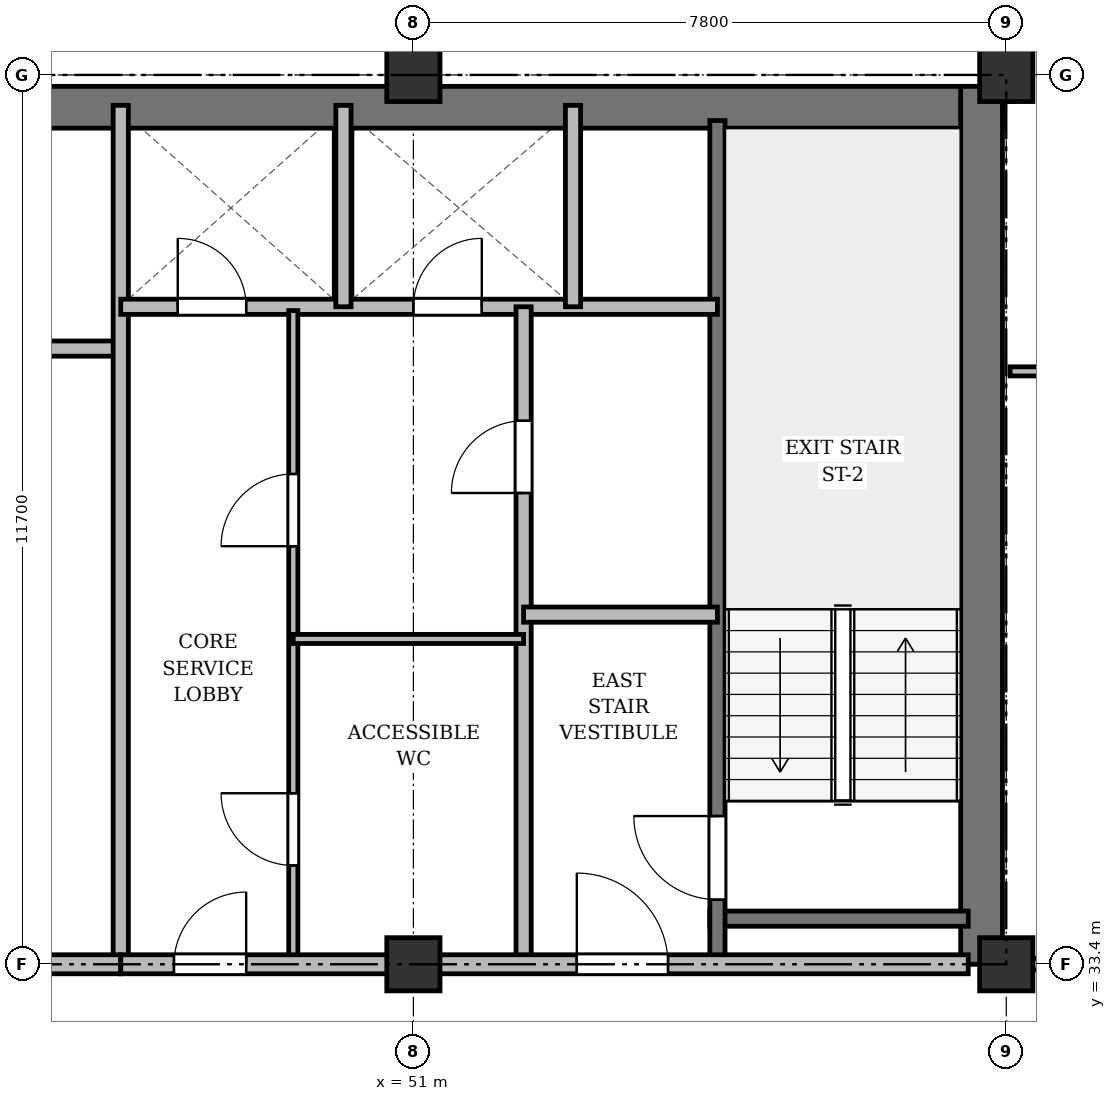
"""IFC4 building model, lengths in metres.
Left out: names, types, materials, properties, quantities, classifications, styles, units other than length and angle.
Written with IfcOpenShell. Run it as: python <this file> out.ifc"""

import sys

from ifc_helpers import new_model, si_unit, direction, frame, frame_2d, origin, origin_2d, place, context, subcontext, project, spatial, rectangle, extrude, source, transform, mapped, element, fill, save


model = new_model("IFC4")
c1 = context("Model", 3, precision=1e-05, world=origin(), true_north=direction((0.0, 1.0)))
c2 = subcontext(c1, "Body", "Model", "MODEL_VIEW")
j1 = project(units=[si_unit("LENGTHUNIT", "METRE"), si_unit("PLANEANGLEUNIT", "RADIAN")], contexts=[c1])
p1 = place(None, origin())
s1 = spatial("IfcSite", under=j1, at=p1, CompositionType="ELEMENT")
p2 = place(p1, origin())
s2 = spatial("IfcBuilding", under=s1, at=p2, CompositionType="ELEMENT")
p3 = place(p2, frame((0.0, 0.0, 164.5)))
s3 = spatial("IfcBuildingStorey", under=s2, at=p3, CompositionType="ELEMENT", Elevation=164.5)
m1 = source(origin(), c2, "Body", "SweptSolid", [
    extrude(rectangle(XDim=0.7, YDim=0.7, at=origin_2d()), origin(), (0.0, 0.0, 1.0), 3.6),
])
for number, where, z_axis, x_axis in (
    (1, (51.0, 33.4, 0.0), (0.0, 0.0, 1.0), (1.0, 0.0, 0.0)),
    (2, (51.0, 45.1, 0.0), (0.0, 0.0, 1.0), (1.0, 0.0, 0.0)),
    (3, (58.8, 33.4, 0.0), (0.0, 0.0, 1.0), (1.0, 0.0, 0.0)),
    (4, (58.8, 45.1, 0.0), (0.0, 0.0, 1.0), (1.0, 0.0, 0.0)),
):
    element("IfcColumn", number, at=place(p3, frame(where, z_axis=z_axis, x_axis=x_axis)), inside=s3, PredefinedType="COLUMN", context=c2, shape_type="MappedRepresentation", body=[
        mapped(m1, transform((0.0, 0.0, 0.0), x_axis=(1.0, 0.0, 0.0), y_axis=(0.0, 1.0, 0.0), z_axis=(0.0, 0.0, 1.0), scale=1.0)),
    ])
p4 = place(p3, frame((15.65, 44.675, 0.0), z_axis=(0.0, 0.0, 1.0), x_axis=(1.0, 0.0, 0.0)))
e5 = element("IfcWall", 5, at=p4, inside=s3, PredefinedType="SHEAR", context=c2, shape_type="SweptSolid", body=[
    extrude(rectangle(XDim=43.1, YDim=0.55, at=frame_2d((21.55, 0.0))), origin(), (0.0, 0.0, 1.0), 3.35),
])
p5 = place(p3, frame((58.475, 33.4, 0.0), z_axis=(0.0, 0.0, 1.0), x_axis=(0.0, 1.0, 0.0)))
e6 = element("IfcWall", 6, at=p5, inside=s3, PredefinedType="SHEAR", context=c2, shape_type="SweptSolid", body=[
    extrude(rectangle(XDim=11.55, YDim=0.55, at=frame_2d((5.775, 0.0))), origin(), (0.0, 0.0, 1.0), 3.35),
])
p6 = place(p3, frame((54.9, 34.0, 0.0), z_axis=(0.0, 0.0, 1.0), x_axis=(1.0, 0.0, 0.0)))
e7 = element("IfcWall", 7, at=p6, inside=s3, PredefinedType="SHEAR", context=c2, shape_type="SweptSolid", body=[
    extrude(rectangle(XDim=3.4, YDim=0.2, at=frame_2d((1.7, 0.0))), origin(), (0.0, 0.0, 1.0), 3.35),
])
p7 = place(p3, frame((55.0, 33.4, 0.0), z_axis=(0.0, 0.0, 1.0), x_axis=(0.0, 1.0, 0.0)))
e8 = element("IfcWall", 8, at=p7, inside=s3, PredefinedType="SHEAR", context=c2, shape_type="SweptSolid", body=[
    extrude(rectangle(XDim=11.1, YDim=0.2, at=frame_2d((5.55, 0.0))), origin(), (0.0, 0.0, 1.0), 3.35),
])
p8 = place(p7, frame((0.85, 0.0, 0.0)))
e9 = element("IfcOpeningElement", 9, at=p8, cuts=e8, PredefinedType="OPENING", context=c2, shape_type="SweptSolid", body=[
    extrude(rectangle(XDim=1.1, YDim=2.15, at=frame_2d((0.55, 1.075))), frame((0.0, 0.11, 0.0), z_axis=(0.0, -1.0, 0.0), x_axis=(1.0, 0.0, 0.0)), (0.0, 0.0, 1.0), 0.22),
])
p9 = place(p3, frame((40.25, 41.5, 0.0), z_axis=(0.0, 0.0, 1.0), x_axis=(1.0, 0.0, 0.0)))
e10 = element("IfcWall", 10, at=p9, inside=s3, PredefinedType="SOLIDWALL", context=c2, shape_type="SweptSolid", body=[
    extrude(rectangle(XDim=6.9, YDim=0.2, at=frame_2d((3.45, 0.0))), origin(), (0.0, 0.0, 1.0), 2.85),
])
p10 = place(p3, frame((47.15, 33.4, 0.0), z_axis=(0.0, 0.0, 1.0), x_axis=(0.0, 1.0, 0.0)))
e11 = element("IfcWall", 11, at=p10, inside=s3, PredefinedType="SOLIDWALL", context=c2, shape_type="SweptSolid", body=[
    extrude(rectangle(XDim=11.3, YDim=0.2, at=frame_2d((5.65, 0.0))), origin(), (0.0, 0.0, 1.0), 2.75),
])
p11 = place(p3, frame((33.3, 33.4, 0.0), z_axis=(0.0, 0.0, 1.0), x_axis=(1.0, 0.0, 0.0)))
e12 = element("IfcWall", 12, at=p11, inside=s3, PredefinedType="PARTITIONING", context=c2, shape_type="SweptSolid", body=[
    extrude(rectangle(XDim=13.85, YDim=0.25, at=frame_2d((6.925, 0.0))), origin(), (0.0, 0.0, 1.0), 2.75),
])
p12 = place(p11, frame((4.2, 0.0, 0.0)))
e13 = element("IfcOpeningElement", 13, at=p12, cuts=e12, PredefinedType="OPENING", context=c2, shape_type="SweptSolid", body=[
    extrude(rectangle(XDim=1.6, YDim=2.2, at=frame_2d((0.8, 1.1))), frame((0.0, 0.135, 0.0), z_axis=(0.0, -1.0, 0.0), x_axis=(1.0, 0.0, 0.0)), (0.0, 0.0, 1.0), 0.27),
])
p13 = place(p3, frame((47.15, 42.05, 0.0), z_axis=(0.0, 0.0, 1.0), x_axis=(1.0, 0.0, 0.0)))
e14 = element("IfcWall", 14, at=p13, inside=s3, PredefinedType="SOLIDWALL", context=c2, shape_type="SweptSolid", body=[
    extrude(rectangle(XDim=7.85, YDim=0.2, at=frame_2d((3.925, 0.0))), origin(), (0.0, 0.0, 1.0), 2.85),
])
p14 = place(p13, frame((0.75, 0.0, 0.0)))
e15 = element("IfcOpeningElement", 15, at=p14, cuts=e14, PredefinedType="OPENING", context=c2, shape_type="SweptSolid", body=[
    extrude(rectangle(XDim=0.9, YDim=2.1, at=frame_2d((0.45, 1.05))), frame((0.0, 0.11, 0.0), z_axis=(0.0, -1.0, 0.0), x_axis=(1.0, 0.0, 0.0)), (0.0, 0.0, 1.0), 0.22),
])
p15 = place(p13, frame((3.85, 0.0, 0.0)))
e16 = element("IfcOpeningElement", 16, at=p15, cuts=e14, PredefinedType="OPENING", context=c2, shape_type="SweptSolid", body=[
    extrude(rectangle(XDim=0.9, YDim=2.1, at=frame_2d((0.45, 1.05))), frame((0.0, 0.11, 0.0), z_axis=(0.0, -1.0, 0.0), x_axis=(1.0, 0.0, 0.0)), (0.0, 0.0, 1.0), 0.22),
])
for number, where, z_axis, x_axis in (
    (17, (50.08, 42.05, 0.0), (0.0, 0.0, 1.0), (0.0, 1.0, 0.0)),
    (18, (53.1, 42.05, 0.0), (0.0, 0.0, 1.0), (0.0, 1.0, 0.0)),
):
    element("IfcWall", number, at=place(p3, frame(where, z_axis=z_axis, x_axis=x_axis)), inside=s3, PredefinedType="SOLIDWALL", context=c2, shape_type="SweptSolid", body=[
        extrude(rectangle(XDim=2.65, YDim=0.2, at=frame_2d((1.325, 0.0))), origin(), (0.0, 0.0, 1.0), 3.35),
    ])
p16 = place(p3, frame((52.45, 33.4, 0.0), z_axis=(0.0, 0.0, 1.0), x_axis=(0.0, 1.0, 0.0)))
e19 = element("IfcWall", 19, at=p16, inside=s3, PredefinedType="PARTITIONING", context=c2, shape_type="SweptSolid", body=[
    extrude(rectangle(XDim=8.65, YDim=0.2, at=frame_2d((4.325, 0.0))), origin(), (0.0, 0.0, 1.0), 2.75),
])
p17 = place(p16, frame((6.2, 0.0, 0.0)))
e20 = element("IfcOpeningElement", 20, at=p17, cuts=e19, PredefinedType="OPENING", context=c2, shape_type="SweptSolid", body=[
    extrude(rectangle(XDim=0.95, YDim=2.15, at=frame_2d((0.475, 1.075))), frame((0.0, 0.11, 0.0), z_axis=(0.0, -1.0, 0.0), x_axis=(1.0, 0.0, 0.0)), (0.0, 0.0, 1.0), 0.22),
])
p18 = place(p3, frame((52.45, 38.0, 0.0), z_axis=(0.0, 0.0, 1.0), x_axis=(1.0, 0.0, 0.0)))
e21 = element("IfcWall", 21, at=p18, inside=s3, PredefinedType="PARTITIONING", context=c2, shape_type="SweptSolid", body=[
    extrude(rectangle(XDim=2.55, YDim=0.2, at=frame_2d((1.275, 0.0))), origin(), (0.0, 0.0, 1.0), 3.35),
])
p19 = place(p3, frame((49.42, 33.4, 0.0), z_axis=(0.0, 0.0, 1.0), x_axis=(0.0, 1.0, 0.0)))
e22 = element("IfcWall", 22, at=p19, inside=s3, PredefinedType="PARTITIONING", context=c2, shape_type="SweptSolid", body=[
    extrude(rectangle(XDim=8.6, YDim=0.12, at=frame_2d((4.3, 0.0))), origin(), (0.0, 0.0, 1.0), 2.75),
])
p20 = place(p19, frame((1.3, 0.0, 0.0)))
e23 = element("IfcOpeningElement", 23, at=p20, cuts=e22, PredefinedType="OPENING", context=c2, shape_type="SweptSolid", body=[
    extrude(rectangle(XDim=0.95, YDim=2.15, at=frame_2d((0.475, 1.075))), frame((0.0, 0.07, 0.0), z_axis=(0.0, -1.0, 0.0), x_axis=(1.0, 0.0, 0.0)), (0.0, 0.0, 1.0), 0.14),
])
p21 = place(p19, frame((5.5, 0.0, 0.0)))
e24 = element("IfcOpeningElement", 24, at=p21, cuts=e22, PredefinedType="OPENING", context=c2, shape_type="SweptSolid", body=[
    extrude(rectangle(XDim=0.95, YDim=2.15, at=frame_2d((0.475, 1.075))), frame((0.0, 0.07, 0.0), z_axis=(0.0, -1.0, 0.0), x_axis=(1.0, 0.0, 0.0)), (0.0, 0.0, 1.0), 0.14),
])
p22 = place(p3, frame((49.42, 37.68, 0.0), z_axis=(0.0, 0.0, 1.0), x_axis=(1.0, 0.0, 0.0)))
e25 = element("IfcWall", 25, at=p22, inside=s3, PredefinedType="PARTITIONING", context=c2, shape_type="SweptSolid", body=[
    extrude(rectangle(XDim=3.03, YDim=0.12, at=frame_2d((1.515, 0.0))), origin(), (0.0, 0.0, 1.0), 2.85),
])
p23 = place(p3, frame((47.15, 33.4, 0.0), z_axis=(0.0, 0.0, 1.0), x_axis=(1.0, 0.0, 0.0)))
e26 = element("IfcWall", 26, at=p23, inside=s3, PredefinedType="PARTITIONING", context=c2, shape_type="SweptSolid", body=[
    extrude(rectangle(XDim=11.15, YDim=0.25, at=frame_2d((5.575, 0.0))), origin(), (0.0, 0.0, 1.0), 2.75),
])
p24 = place(p23, frame((0.7, 0.0, 0.0)))
e27 = element("IfcOpeningElement", 27, at=p24, cuts=e26, PredefinedType="OPENING", context=c2, shape_type="SweptSolid", body=[
    extrude(rectangle(XDim=0.95, YDim=2.15, at=frame_2d((0.475, 1.075))), frame((0.0, 0.135, 0.0), z_axis=(0.0, -1.0, 0.0), x_axis=(1.0, 0.0, 0.0)), (0.0, 0.0, 1.0), 0.27),
])
p25 = place(p23, frame((6.0, 0.0, 0.0)))
e28 = element("IfcOpeningElement", 28, at=p25, cuts=e26, PredefinedType="OPENING", context=c2, shape_type="SweptSolid", body=[
    extrude(rectangle(XDim=1.2, YDim=2.15, at=frame_2d((0.6, 1.075))), frame((0.0, 0.135, 0.0), z_axis=(0.0, -1.0, 0.0), x_axis=(1.0, 0.0, 0.0)), (0.0, 0.0, 1.0), 0.27),
])
p26 = place(p3, frame((58.85, 41.2, 0.0), z_axis=(0.0, 0.0, 1.0), x_axis=(1.0, 0.0, 0.0)))
e29 = element("IfcWall", 29, at=p26, inside=s3, PredefinedType="PARTITIONING", context=c2, shape_type="SweptSolid", body=[
    extrude(rectangle(XDim=7.45, YDim=0.12, at=frame_2d((3.725, 0.0))), origin(), (0.0, 0.0, 1.0), 2.85),
])
p27 = place(p26, frame((3.157, 0.0, 0.0)))
e30 = element("IfcOpeningElement", 30, at=p27, cuts=e29, PredefinedType="OPENING", context=c2, shape_type="SweptSolid", body=[
    extrude(rectangle(XDim=0.95, YDim=2.15, at=frame_2d((0.475, 1.075))), frame((0.0, 0.07, 0.0), z_axis=(0.0, -1.0, 0.0), x_axis=(1.0, 0.0, 0.0)), (0.0, 0.0, 1.0), 0.14),
])
p28 = place(p3, frame((58.8, 33.4, 0.0), z_axis=(0.0, 0.0, 1.0), x_axis=(1.0, 0.0, 0.0)))
e31 = element("IfcWall", 31, at=p28, inside=s3, PredefinedType="PARTITIONING", context=c2, shape_type="SweptSolid", body=[
    extrude(rectangle(XDim=7.55, YDim=0.15, at=frame_2d((3.775, 0.0))), origin(), (0.0, 0.0, 1.0), 2.75),
])
p29 = place(p28, frame((3.2, 0.0, 0.0)))
e32 = element("IfcOpeningElement", 32, at=p29, cuts=e31, PredefinedType="OPENING", context=c2, shape_type="SweptSolid", body=[
    extrude(rectangle(XDim=0.95, YDim=2.15, at=frame_2d((0.475, 1.075))), frame((0.0, 0.085, 0.0), z_axis=(0.0, -1.0, 0.0), x_axis=(1.0, 0.0, 0.0)), (0.0, 0.0, 1.0), 0.17),
])
p30 = place(p3, frame((58.8, 44.75, 0.0), z_axis=(0.0, 0.0, 1.0), x_axis=(0.0, 1.0, 0.0)))
e33 = element("IfcWall", 33, at=p30, inside=s3, PredefinedType="PARTITIONING", context=c2, shape_type="SweptSolid", body=[
    extrude(rectangle(XDim=3.61, YDim=0.15, at=frame_2d((1.805, 0.0))), origin(), (0.0, 0.0, 1.0), 2.85),
])
p31 = place(p30, frame((1.1, 0.0, 0.0)))
e34 = element("IfcOpeningElement", 34, at=p31, cuts=e33, PredefinedType="OPENING", context=c2, shape_type="SweptSolid", body=[
    extrude(rectangle(XDim=0.95, YDim=2.15, at=frame_2d((0.475, 1.075))), frame((0.0, 0.085, 0.0), z_axis=(0.0, -1.0, 0.0), x_axis=(1.0, 0.0, 0.0)), (0.0, 0.0, 1.0), 0.17),
])
m2 = source(origin(), c2, "Body", "SweptSolid", [
    extrude(rectangle(XDim=1.1, YDim=2.15, at=frame_2d((0.55, 1.075))), frame((0.0, 0.025, 0.0), z_axis=(0.0, -1.0, 0.0), x_axis=(1.0, 0.0, 0.0)), (0.0, 0.0, 1.0), 0.05),
])
p32 = place(p8, origin())
e35 = element("IfcDoor", 35, at=p32, inside=s3, OperationType="SINGLE_SWING_RIGHT", PredefinedType="DOOR", context=c2, shape_type="MappedRepresentation", body=[
    mapped(m2, transform((0.0, 0.0, 0.0), x_axis=(1.0, 0.0, 0.0), y_axis=(0.0, 1.0, 0.0), z_axis=(0.0, 0.0, 1.0), scale=1.0)),
])
fill(e9, e35)
m3 = source(origin(), c2, "Body", "SweptSolid", [
    extrude(rectangle(XDim=0.9, YDim=2.1, at=frame_2d((0.45, 1.05))), frame((0.0, 0.025, 0.0), z_axis=(0.0, -1.0, 0.0), x_axis=(1.0, 0.0, 0.0)), (0.0, 0.0, 1.0), 0.05),
])
p33 = place(p14, origin())
e36 = element("IfcDoor", 36, at=p33, inside=s3, OperationType="SINGLE_SWING_LEFT", PredefinedType="DOOR", context=c2, shape_type="MappedRepresentation", body=[
    mapped(m3, transform((0.0, 0.0, 0.0), x_axis=(1.0, 0.0, 0.0), y_axis=(0.0, 1.0, 0.0), z_axis=(0.0, 0.0, 1.0), scale=1.0)),
])
fill(e15, e36)
p34 = place(p15, origin())
e37 = element("IfcDoor", 37, at=p34, inside=s3, OperationType="SINGLE_SWING_RIGHT", PredefinedType="DOOR", context=c2, shape_type="MappedRepresentation", body=[
    mapped(m3, transform((0.0, 0.0, 0.0), x_axis=(1.0, 0.0, 0.0), y_axis=(0.0, 1.0, 0.0), z_axis=(0.0, 0.0, 1.0), scale=1.0)),
])
fill(e16, e37)
m4 = source(origin(), c2, "Body", "SweptSolid", [
    extrude(rectangle(XDim=0.95, YDim=2.15, at=frame_2d((0.475, 1.075))), frame((0.0, 0.025, 0.0), z_axis=(0.0, -1.0, 0.0), x_axis=(1.0, 0.0, 0.0)), (0.0, 0.0, 1.0), 0.05),
])
p35 = place(p17, origin())
e38 = element("IfcDoor", 38, at=p35, inside=s3, OperationType="SINGLE_SWING_LEFT", PredefinedType="DOOR", context=c2, shape_type="MappedRepresentation", body=[
    mapped(m4, transform((0.0, 0.0, 0.0), x_axis=(1.0, 0.0, 0.0), y_axis=(0.0, 1.0, 0.0), z_axis=(0.0, 0.0, 1.0), scale=1.0)),
])
fill(e20, e38)
p36 = place(p20, origin())
e39 = element("IfcDoor", 39, at=p36, inside=s3, OperationType="SINGLE_SWING_RIGHT", PredefinedType="DOOR", context=c2, shape_type="MappedRepresentation", body=[
    mapped(m4, transform((0.0, 0.0, 0.0), x_axis=(1.0, 0.0, 0.0), y_axis=(0.0, 1.0, 0.0), z_axis=(0.0, 0.0, 1.0), scale=1.0)),
])
fill(e23, e39)
p37 = place(p21, origin())
e40 = element("IfcDoor", 40, at=p37, inside=s3, OperationType="SINGLE_SWING_LEFT", PredefinedType="DOOR", context=c2, shape_type="MappedRepresentation", body=[
    mapped(m4, transform((0.0, 0.0, 0.0), x_axis=(1.0, 0.0, 0.0), y_axis=(0.0, 1.0, 0.0), z_axis=(0.0, 0.0, 1.0), scale=1.0)),
])
fill(e24, e40)
p38 = place(p24, origin())
e41 = element("IfcDoor", 41, at=p38, inside=s3, OperationType="SINGLE_SWING_RIGHT", PredefinedType="DOOR", context=c2, shape_type="MappedRepresentation", body=[
    mapped(m4, transform((0.0, 0.0, 0.0), x_axis=(1.0, 0.0, 0.0), y_axis=(0.0, 1.0, 0.0), z_axis=(0.0, 0.0, 1.0), scale=1.0)),
])
fill(e27, e41)
m5 = source(origin(), c2, "Body", "SweptSolid", [
    extrude(rectangle(XDim=1.2, YDim=2.15, at=frame_2d((0.6, 1.075))), frame((0.0, 0.025, 0.0), z_axis=(0.0, -1.0, 0.0), x_axis=(1.0, 0.0, 0.0)), (0.0, 0.0, 1.0), 0.05),
])
p39 = place(p25, origin())
e42 = element("IfcDoor", 42, at=p39, inside=s3, OperationType="SINGLE_SWING_LEFT", PredefinedType="DOOR", context=c2, shape_type="MappedRepresentation", body=[
    mapped(m5, transform((0.0, 0.0, 0.0), x_axis=(1.0, 0.0, 0.0), y_axis=(0.0, 1.0, 0.0), z_axis=(0.0, 0.0, 1.0), scale=1.0)),
])
fill(e28, e42)
save(model, sys.argv[1])
